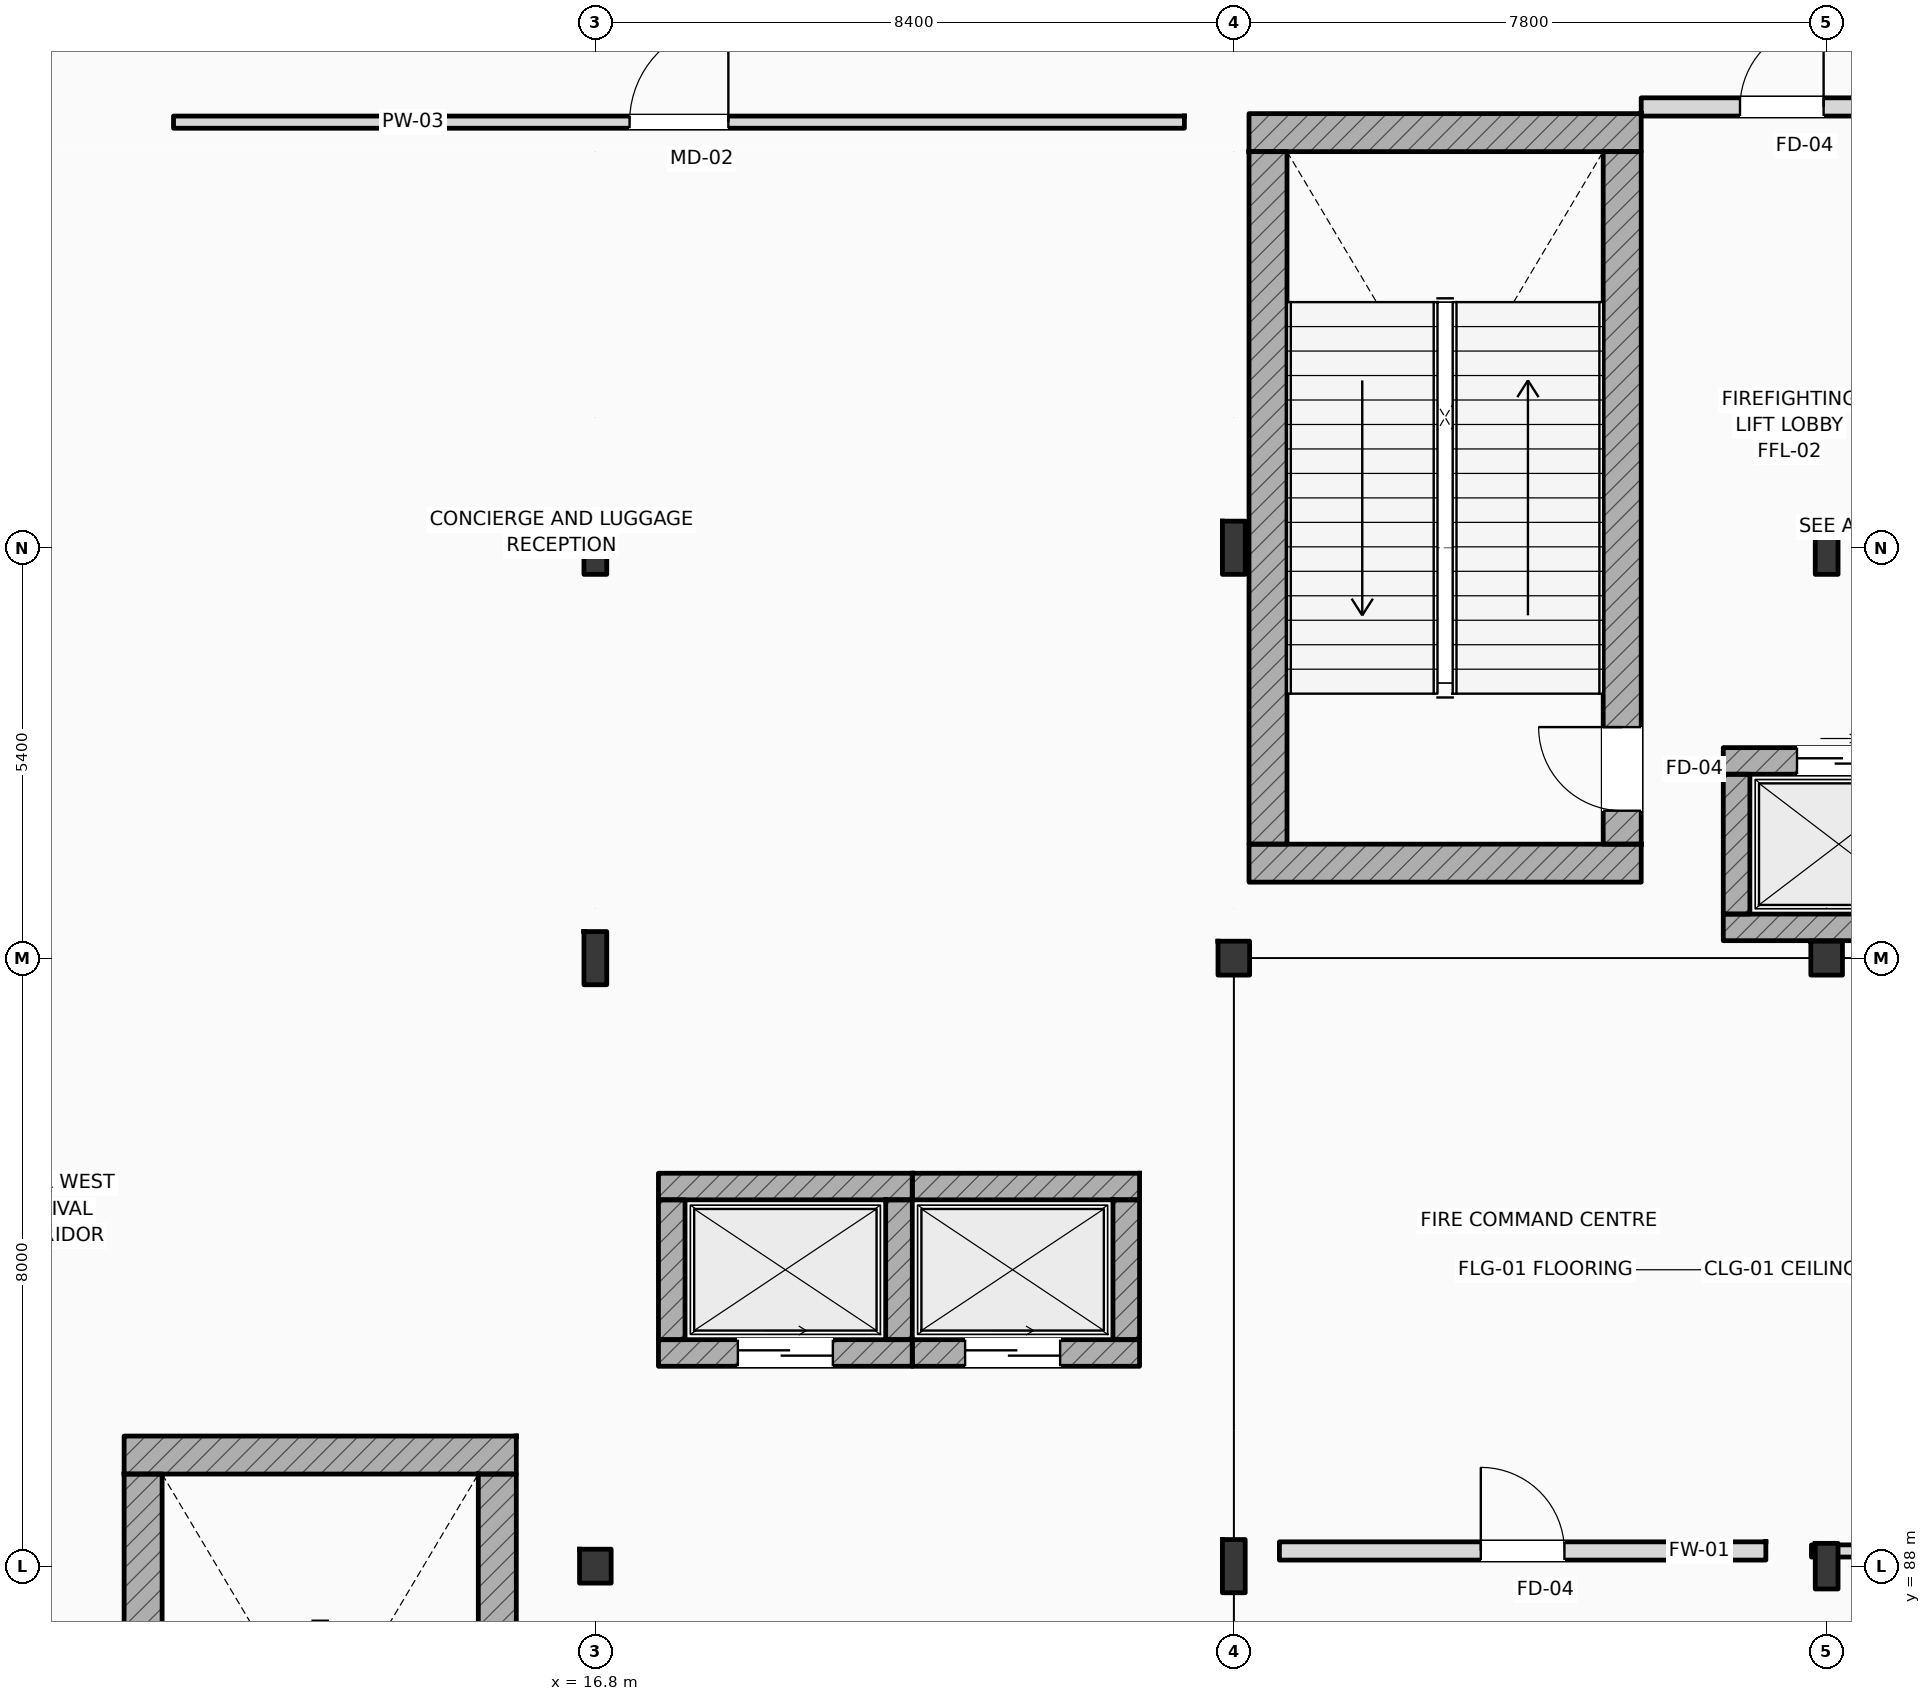
"""IFC4 building model, lengths in metres.
Left out: names, types, materials, properties, quantities, classifications, styles, units other than length and angle.
Written with IfcOpenShell. Run it as: python <this file> out.ifc"""

import sys

from ifc_helpers import new_model, si_unit, direction, frame, frame_2d, origin, origin_2d, place, context, subcontext, project, spatial, rectangle, i_section, extrude, element, fill, save


model = new_model("IFC4")
c1 = context("Model", 3, precision=1e-05, world=origin(), true_north=direction((0.0, 1.0)))
c2 = subcontext(c1, "Body", "Model", "MODEL_VIEW")
j1 = project(units=[si_unit("LENGTHUNIT", "METRE"), si_unit("PLANEANGLEUNIT", "RADIAN")], contexts=[c1])
p1 = place(None, origin())
s1 = spatial("IfcSite", under=j1, at=p1, CompositionType="ELEMENT")
p2 = place(p1, origin())
s2 = spatial("IfcBuilding", under=s1, at=p2, CompositionType="ELEMENT")
p3 = place(p2, origin())
s3 = spatial("IfcBuildingStorey", under=s2, at=p3, CompositionType="ELEMENT", Elevation=0.0)
p4 = place(p3, frame((16.8, 88.0, 0.0), z_axis=(0.0, 0.0, 1.0), x_axis=(1.0, 0.0, 0.0)))
e1 = element("IfcColumn", 1, at=p4, inside=s3, PredefinedType="COLUMN", context=c2, shape_type="SweptSolid", body=[
    extrude(i_section(OverallWidth=0.416, OverallDepth=0.446, WebThickness=0.036, FlangeThickness=0.048, FilletRadius=0.015, at=origin_2d()), origin(), (0.0, 0.0, 1.0), 6.0),
])
for number, where, z_axis, x_axis in (
    (2, (16.8, 96.0, 0.0), (0.0, 0.0, 1.0), (1.0, 0.0, 0.0)),
    (3, (25.2, 88.0, 0.0), (0.0, 0.0, 1.0), (1.0, 0.0, 0.0)),
):
    element("IfcColumn", number, at=place(p3, frame(where, z_axis=z_axis, x_axis=x_axis)), inside=s3, PredefinedType="COLUMN", context=c2, shape_type="SweptSolid", body=[
        extrude(i_section(OverallWidth=0.3, OverallDepth=0.7, WebThickness=0.017, FlangeThickness=0.032, FilletRadius=0.027, at=origin_2d()), origin(), (0.0, 0.0, 1.0), 6.0),
    ])
p5 = place(p3, frame((25.2, 96.0, 0.0), z_axis=(0.0, 0.0, 1.0), x_axis=(1.0, 0.0, 0.0)))
e4 = element("IfcColumn", 4, at=p5, inside=s3, PredefinedType="COLUMN", context=c2, shape_type="SweptSolid", body=[
    extrude(i_section(OverallWidth=0.416, OverallDepth=0.446, WebThickness=0.036, FlangeThickness=0.048, FilletRadius=0.015, at=origin_2d()), origin(), (0.0, 0.0, 1.0), 6.0),
])
for number, where, z_axis, x_axis in (
    (5, (16.8, 101.4, 0.0), (0.0, 0.0, 1.0), (1.0, 0.0, 0.0)),
    (6, (25.2, 101.4, 0.0), (0.0, 0.0, 1.0), (1.0, 0.0, 0.0)),
):
    element("IfcColumn", number, at=place(p3, frame(where, z_axis=z_axis, x_axis=x_axis)), inside=s3, PredefinedType="COLUMN", context=c2, shape_type="SweptSolid", body=[
        extrude(i_section(OverallWidth=0.3, OverallDepth=0.7, WebThickness=0.017, FlangeThickness=0.032, FilletRadius=0.027, at=origin_2d()), origin(), (0.0, 0.0, 1.0), 6.0),
    ])
p6 = place(p3, frame((33.0, 96.0, 0.0), z_axis=(0.0, 0.0, 1.0), x_axis=(1.0, 0.0, 0.0)))
e7 = element("IfcColumn", 7, at=p6, inside=s3, PredefinedType="COLUMN", context=c2, shape_type="SweptSolid", body=[
    extrude(i_section(OverallWidth=0.416, OverallDepth=0.446, WebThickness=0.036, FlangeThickness=0.048, FilletRadius=0.015, at=origin_2d()), origin(), (0.0, 0.0, 1.0), 6.0),
])
p7 = place(p3, frame((33.0, 101.4, 0.0), z_axis=(0.0, 0.0, 1.0), x_axis=(1.0, 0.0, 0.0)))
e8 = element("IfcColumn", 8, at=p7, inside=s3, PredefinedType="COLUMN", context=c2, shape_type="SweptSolid", body=[
    extrude(i_section(OverallWidth=0.3, OverallDepth=0.7, WebThickness=0.017, FlangeThickness=0.032, FilletRadius=0.027, at=origin_2d()), origin(), (0.0, 0.0, 1.0), 6.0),
])
p8 = place(p3, frame((33.0, 88.0, 0.0), z_axis=(0.0, 0.0, 1.0), x_axis=(1.0, 0.0, 0.0)))
e9 = element("IfcColumn", 9, at=p8, inside=s3, PredefinedType="COLUMN", context=c2, shape_type="SweptSolid", body=[
    extrude(i_section(OverallWidth=0.3, OverallDepth=0.6, WebThickness=0.015, FlangeThickness=0.03, FilletRadius=0.027, at=origin_2d()), origin(), (0.0, 0.0, 1.0), 6.0),
])
p9 = place(p3, frame((10.6, 89.462, 0.0), z_axis=(0.0, 0.0, 1.0), x_axis=(1.0, 0.0, 0.0)))
e10 = element("IfcWall", 10, at=p9, inside=s3, PredefinedType="SHEAR", context=c2, shape_type="SweptSolid", body=[
    extrude(rectangle(XDim=5.16, YDim=0.5, at=frame_2d((2.58, 0.0))), origin(), (0.0, 0.0, 1.0), 6.0),
])
p10 = place(p3, frame((10.85, 80.1, 0.0), z_axis=(0.0, 0.0, 1.0), x_axis=(0.0, 1.0, 0.0)))
e11 = element("IfcWall", 11, at=p10, inside=s3, PredefinedType="SHEAR", context=c2, shape_type="SweptSolid", body=[
    extrude(rectangle(XDim=9.112, YDim=0.5, at=frame_2d((4.556, 0.0))), origin(), (0.0, 0.0, 1.0), 6.0),
])
p11 = place(p3, frame((15.51, 80.1, 0.0), z_axis=(0.0, 0.0, 1.0), x_axis=(0.0, 1.0, 0.0)))
e12 = element("IfcWall", 12, at=p11, inside=s3, PredefinedType="SHEAR", context=c2, shape_type="SweptSolid", body=[
    extrude(rectangle(XDim=9.112, YDim=0.5, at=frame_2d((4.556, 0.0))), origin(), (0.0, 0.0, 1.0), 6.0),
])
p12 = place(p11, frame((0.44, 0.0, 0.0)))
e13 = element("IfcOpeningElement", 13, at=p12, cuts=e12, PredefinedType="OPENING", context=c2, shape_type="SweptSolid", body=[
    extrude(rectangle(XDim=1.1, YDim=2.2, at=frame_2d((0.55, 1.1))), frame((0.0, 0.26, 0.0), z_axis=(0.0, -1.0, 0.0), x_axis=(1.0, 0.0, 0.0)), (0.0, 0.0, 1.0), 0.52),
])
for number, where, z_axis, x_axis in (
    (14, (25.4, 106.862, 0.0), (0.0, 0.0, 1.0), (1.0, 0.0, 0.0)),
    (15, (25.4, 97.25, 0.0), (0.0, 0.0, 1.0), (1.0, 0.0, 0.0)),
):
    element("IfcWall", number, at=place(p3, frame(where, z_axis=z_axis, x_axis=x_axis)), inside=s3, PredefinedType="SHEAR", context=c2, shape_type="SweptSolid", body=[
        extrude(rectangle(XDim=5.16, YDim=0.5, at=frame_2d((2.58, 0.0))), origin(), (0.0, 0.0, 1.0), 6.0),
    ])
p13 = place(p3, frame((25.65, 97.5, 0.0), z_axis=(0.0, 0.0, 1.0), x_axis=(0.0, 1.0, 0.0)))
e16 = element("IfcWall", 16, at=p13, inside=s3, PredefinedType="SHEAR", context=c2, shape_type="SweptSolid", body=[
    extrude(rectangle(XDim=9.112, YDim=0.5, at=frame_2d((4.556, 0.0))), origin(), (0.0, 0.0, 1.0), 6.0),
])
p14 = place(p3, frame((30.31, 97.5, 0.0), z_axis=(0.0, 0.0, 1.0), x_axis=(0.0, 1.0, 0.0)))
e17 = element("IfcWall", 17, at=p14, inside=s3, PredefinedType="SHEAR", context=c2, shape_type="SweptSolid", body=[
    extrude(rectangle(XDim=9.112, YDim=0.5, at=frame_2d((4.556, 0.0))), origin(), (0.0, 0.0, 1.0), 6.0),
])
p15 = place(p14, frame((0.44, 0.0, 0.0)))
e18 = element("IfcOpeningElement", 18, at=p15, cuts=e17, PredefinedType="OPENING", context=c2, shape_type="SweptSolid", body=[
    extrude(rectangle(XDim=1.1, YDim=2.2, at=frame_2d((0.55, 1.1))), frame((0.0, 0.26, 0.0), z_axis=(0.0, -1.0, 0.0), x_axis=(1.0, 0.0, 0.0)), (0.0, 0.0, 1.0), 0.52),
])
p16 = place(p3, frame((31.64, 98.595, 0.0), z_axis=(0.0, 0.0, 1.0), x_axis=(1.0, 0.0, 0.0)))
e19 = element("IfcWall", 19, at=p16, inside=s3, PredefinedType="SHEAR", context=c2, shape_type="SweptSolid", body=[
    extrude(rectangle(XDim=2.69, YDim=0.35, at=frame_2d((1.345, 0.0))), origin(), (0.0, 0.0, 1.0), 5.7),
])
p17 = place(p16, frame((0.97, 0.0, 0.0)))
e20 = element("IfcOpeningElement", 20, at=p17, cuts=e19, PredefinedType="OPENING", context=c2, shape_type="SweptSolid", body=[
    extrude(rectangle(XDim=1.1, YDim=2.2, at=frame_2d((0.55, 1.1))), frame((0.0, 0.185, 0.0), z_axis=(0.0, -1.0, 0.0), x_axis=(1.0, 0.0, 0.0)), (0.0, 0.0, 1.0), 0.37),
])
p18 = place(p3, frame((31.64, 96.405, 0.0), z_axis=(0.0, 0.0, 1.0), x_axis=(1.0, 0.0, 0.0)))
e21 = element("IfcWall", 21, at=p18, inside=s3, PredefinedType="SHEAR", context=c2, shape_type="SweptSolid", body=[
    extrude(rectangle(XDim=2.69, YDim=0.35, at=frame_2d((1.345, 0.0))), origin(), (0.0, 0.0, 1.0), 5.7),
])
p19 = place(p3, frame((31.815, 96.58, 0.0), z_axis=(0.0, 0.0, 1.0), x_axis=(0.0, 1.0, 0.0)))
e22 = element("IfcWall", 22, at=p19, inside=s3, PredefinedType="SHEAR", context=c2, shape_type="SweptSolid", body=[
    extrude(rectangle(XDim=1.84, YDim=0.35, at=frame_2d((0.92, 0.0))), origin(), (0.0, 0.0, 1.0), 5.7),
])
p20 = place(p3, frame((17.63, 92.995, 0.0), z_axis=(0.0, 0.0, 1.0), x_axis=(1.0, 0.0, 0.0)))
e23 = element("IfcWall", 23, at=p20, inside=s3, PredefinedType="SHEAR", context=c2, shape_type="SweptSolid", body=[
    extrude(rectangle(XDim=3.34, YDim=0.35, at=frame_2d((1.67, 0.0))), origin(), (0.0, 0.0, 1.0), 5.7),
])
p21 = place(p3, frame((17.63, 90.805, 0.0), z_axis=(0.0, 0.0, 1.0), x_axis=(1.0, 0.0, 0.0)))
e24 = element("IfcWall", 24, at=p21, inside=s3, PredefinedType="SHEAR", context=c2, shape_type="SweptSolid", body=[
    extrude(rectangle(XDim=3.34, YDim=0.35, at=frame_2d((1.67, 0.0))), origin(), (0.0, 0.0, 1.0), 5.7),
])
p22 = place(p21, frame((1.045, 0.0, 0.0)))
e25 = element("IfcOpeningElement", 25, at=p22, cuts=e24, PredefinedType="OPENING", context=c2, shape_type="SweptSolid", body=[
    extrude(rectangle(XDim=1.25, YDim=2.25, at=frame_2d((0.625, 1.125))), frame((0.0, 0.185, 0.0), z_axis=(0.0, -1.0, 0.0), x_axis=(1.0, 0.0, 0.0)), (0.0, 0.0, 1.0), 0.37),
])
for number, where, z_axis, x_axis in (
    (26, (17.805, 90.98, 0.0), (0.0, 0.0, 1.0), (0.0, 1.0, 0.0)),
    (27, (20.795, 90.98, 0.0), (0.0, 0.0, 1.0), (0.0, 1.0, 0.0)),
):
    element("IfcWall", number, at=place(p3, frame(where, z_axis=z_axis, x_axis=x_axis)), inside=s3, PredefinedType="SHEAR", context=c2, shape_type="SweptSolid", body=[
        extrude(rectangle(XDim=1.84, YDim=0.35, at=frame_2d((0.92, 0.0))), origin(), (0.0, 0.0, 1.0), 5.7),
    ])
p23 = place(p3, frame((20.97, 92.995, 0.0), z_axis=(0.0, 0.0, 1.0), x_axis=(1.0, 0.0, 0.0)))
e28 = element("IfcWall", 28, at=p23, inside=s3, PredefinedType="SHEAR", context=c2, shape_type="SweptSolid", body=[
    extrude(rectangle(XDim=2.99, YDim=0.35, at=frame_2d((1.495, 0.0))), origin(), (0.0, 0.0, 1.0), 5.7),
])
p24 = place(p3, frame((20.97, 90.805, 0.0), z_axis=(0.0, 0.0, 1.0), x_axis=(1.0, 0.0, 0.0)))
e29 = element("IfcWall", 29, at=p24, inside=s3, PredefinedType="SHEAR", context=c2, shape_type="SweptSolid", body=[
    extrude(rectangle(XDim=2.99, YDim=0.35, at=frame_2d((1.495, 0.0))), origin(), (0.0, 0.0, 1.0), 5.7),
])
p25 = place(p24, frame((0.695, 0.0, 0.0)))
e30 = element("IfcOpeningElement", 30, at=p25, cuts=e29, PredefinedType="OPENING", context=c2, shape_type="SweptSolid", body=[
    extrude(rectangle(XDim=1.25, YDim=2.25, at=frame_2d((0.625, 1.125))), frame((0.0, 0.185, 0.0), z_axis=(0.0, -1.0, 0.0), x_axis=(1.0, 0.0, 0.0)), (0.0, 0.0, 1.0), 0.37),
])
p26 = place(p3, frame((23.785, 90.98, 0.0), z_axis=(0.0, 0.0, 1.0), x_axis=(0.0, 1.0, 0.0)))
e31 = element("IfcWall", 31, at=p26, inside=s3, PredefinedType="SHEAR", context=c2, shape_type="SweptSolid", body=[
    extrude(rectangle(XDim=1.84, YDim=0.35, at=frame_2d((0.92, 0.0))), origin(), (0.0, 0.0, 1.0), 5.7),
])
p27 = place(p3, frame((30.56, 107.2, 0.0), z_axis=(0.0, 0.0, 1.0), x_axis=(1.0, 0.0, 0.0)))
e32 = element("IfcWall", 32, at=p27, inside=s3, PredefinedType="STANDARD", context=c2, shape_type="SweptSolid", body=[
    extrude(rectangle(XDim=4.1, YDim=0.24, at=frame_2d((2.05, 0.0))), origin(), (0.0, 0.0, 1.0), 5.7),
])
p28 = place(p27, frame((1.3, 0.0, 0.0)))
e33 = element("IfcOpeningElement", 33, at=p28, cuts=e32, PredefinedType="OPENING", context=c2, shape_type="SweptSolid", body=[
    extrude(rectangle(XDim=1.1, YDim=2.2, at=frame_2d((0.55, 1.1))), frame((0.0, 0.13, 0.0), z_axis=(0.0, -1.0, 0.0), x_axis=(1.0, 0.0, 0.0)), (0.0, 0.0, 1.0), 0.26),
])
p29 = place(p3, frame((25.8, 88.2, 0.0), z_axis=(0.0, 0.0, 1.0), x_axis=(1.0, 0.0, 0.0)))
e34 = element("IfcWall", 34, at=p29, inside=s3, PredefinedType="STANDARD", context=c2, shape_type="SweptSolid", body=[
    extrude(rectangle(XDim=6.4, YDim=0.24, at=frame_2d((3.2, 0.0))), origin(), (0.0, 0.0, 1.0), 5.19),
])
p30 = place(p29, frame((2.65, 0.0, 0.0)))
e35 = element("IfcOpeningElement", 35, at=p30, cuts=e34, PredefinedType="OPENING", context=c2, shape_type="SweptSolid", body=[
    extrude(rectangle(XDim=1.1, YDim=2.2, at=frame_2d((0.55, 1.1))), frame((0.0, 0.13, 0.0), z_axis=(0.0, -1.0, 0.0), x_axis=(1.0, 0.0, 0.0)), (0.0, 0.0, 1.0), 0.26),
])
p31 = place(p3, frame((32.8, 88.2, 0.0), z_axis=(0.0, 0.0, 1.0), x_axis=(1.0, 0.0, 0.0)))
e36 = element("IfcWall", 36, at=p31, inside=s3, PredefinedType="PARTITIONING", context=c2, shape_type="SweptSolid", body=[
    extrude(rectangle(XDim=15.2, YDim=0.16, at=frame_2d((7.6, 0.0))), origin(), (0.0, 0.0, 1.0), 5.19),
])
p32 = place(p31, frame((5.45, 0.0, 0.0)))
e37 = element("IfcOpeningElement", 37, at=p32, cuts=e36, PredefinedType="OPENING", context=c2, shape_type="SweptSolid", body=[
    extrude(rectangle(XDim=1.3, YDim=2.2, at=frame_2d((0.65, 1.1))), frame((0.0, 0.09, 0.0), z_axis=(0.0, -1.0, 0.0), x_axis=(1.0, 0.0, 0.0)), (0.0, 0.0, 1.0), 0.18),
])
p33 = place(p3, frame((11.25, 107.0, 0.0), z_axis=(0.0, 0.0, 1.0), x_axis=(1.0, 0.0, 0.0)))
e38 = element("IfcWall", 38, at=p33, inside=s3, PredefinedType="PARTITIONING", context=c2, shape_type="SweptSolid", body=[
    extrude(rectangle(XDim=13.3, YDim=0.16, at=frame_2d((6.65, 0.0))), origin(), (0.0, 0.0, 1.0), 5.7),
])
p34 = place(p33, frame((6.0, 0.0, 0.0)))
e39 = element("IfcOpeningElement", 39, at=p34, cuts=e38, PredefinedType="OPENING", context=c2, shape_type="SweptSolid", body=[
    extrude(rectangle(XDim=1.3, YDim=2.2, at=frame_2d((0.65, 1.1))), frame((0.0, 0.09, 0.0), z_axis=(0.0, -1.0, 0.0), x_axis=(1.0, 0.0, 0.0)), (0.0, 0.0, 1.0), 0.18),
])
p35 = place(p15, origin())
e40 = element("IfcDoor", 40, at=p35, inside=s3, OperationType="SINGLE_SWING_RIGHT", PredefinedType="DOOR", context=c2, shape_type="SweptSolid", body=[
    extrude(rectangle(XDim=1.1, YDim=2.2, at=frame_2d((0.55, 1.1))), frame((0.0, 0.025, 0.0), z_axis=(0.0, -1.0, 0.0), x_axis=(1.0, 0.0, 0.0)), (0.0, 0.0, 1.0), 0.05),
])
fill(e18, e40)
p36 = place(p17, origin())
e41 = element("IfcDoor", 41, at=p36, inside=s3, OperationType="SLIDING_TO_LEFT", PredefinedType="DOOR", context=c2, shape_type="SweptSolid", body=[
    extrude(rectangle(XDim=1.1, YDim=2.2, at=frame_2d((0.55, 1.1))), frame((0.0, 0.025, 0.0), z_axis=(0.0, -1.0, 0.0), x_axis=(1.0, 0.0, 0.0)), (0.0, 0.0, 1.0), 0.05),
])
fill(e20, e41)
p37 = place(p22, origin())
e42 = element("IfcDoor", 42, at=p37, inside=s3, OperationType="SLIDING_TO_LEFT", PredefinedType="DOOR", context=c2, shape_type="SweptSolid", body=[
    extrude(rectangle(XDim=1.25, YDim=2.25, at=frame_2d((0.625, 1.125))), frame((0.0, 0.025, 0.0), z_axis=(0.0, -1.0, 0.0), x_axis=(1.0, 0.0, 0.0)), (0.0, 0.0, 1.0), 0.05),
])
fill(e25, e42)
p38 = place(p25, origin())
e43 = element("IfcDoor", 43, at=p38, inside=s3, OperationType="SLIDING_TO_LEFT", PredefinedType="DOOR", context=c2, shape_type="SweptSolid", body=[
    extrude(rectangle(XDim=1.25, YDim=2.25, at=frame_2d((0.625, 1.125))), frame((0.0, 0.025, 0.0), z_axis=(0.0, -1.0, 0.0), x_axis=(1.0, 0.0, 0.0)), (0.0, 0.0, 1.0), 0.05),
])
fill(e30, e43)
p39 = place(p28, origin())
e44 = element("IfcDoor", 44, at=p39, inside=s3, OperationType="SINGLE_SWING_RIGHT", PredefinedType="DOOR", context=c2, shape_type="SweptSolid", body=[
    extrude(rectangle(XDim=1.1, YDim=2.2, at=frame_2d((0.55, 1.1))), frame((0.0, 0.025, 0.0), z_axis=(0.0, -1.0, 0.0), x_axis=(1.0, 0.0, 0.0)), (0.0, 0.0, 1.0), 0.05),
])
fill(e33, e44)
p40 = place(p30, origin())
e45 = element("IfcDoor", 45, at=p40, inside=s3, OperationType="SINGLE_SWING_LEFT", PredefinedType="DOOR", context=c2, shape_type="SweptSolid", body=[
    extrude(rectangle(XDim=1.1, YDim=2.2, at=frame_2d((0.55, 1.1))), frame((0.0, 0.025, 0.0), z_axis=(0.0, -1.0, 0.0), x_axis=(1.0, 0.0, 0.0)), (0.0, 0.0, 1.0), 0.05),
])
fill(e35, e45)
p41 = place(p34, origin())
e46 = element("IfcDoor", 46, at=p41, inside=s3, OperationType="SINGLE_SWING_RIGHT", PredefinedType="DOOR", context=c2, shape_type="SweptSolid", body=[
    extrude(rectangle(XDim=1.3, YDim=2.2, at=frame_2d((0.65, 1.1))), frame((0.0, 0.025, 0.0), z_axis=(0.0, -1.0, 0.0), x_axis=(1.0, 0.0, 0.0)), (0.0, 0.0, 1.0), 0.05),
])
fill(e39, e46)
save(model, sys.argv[1])
